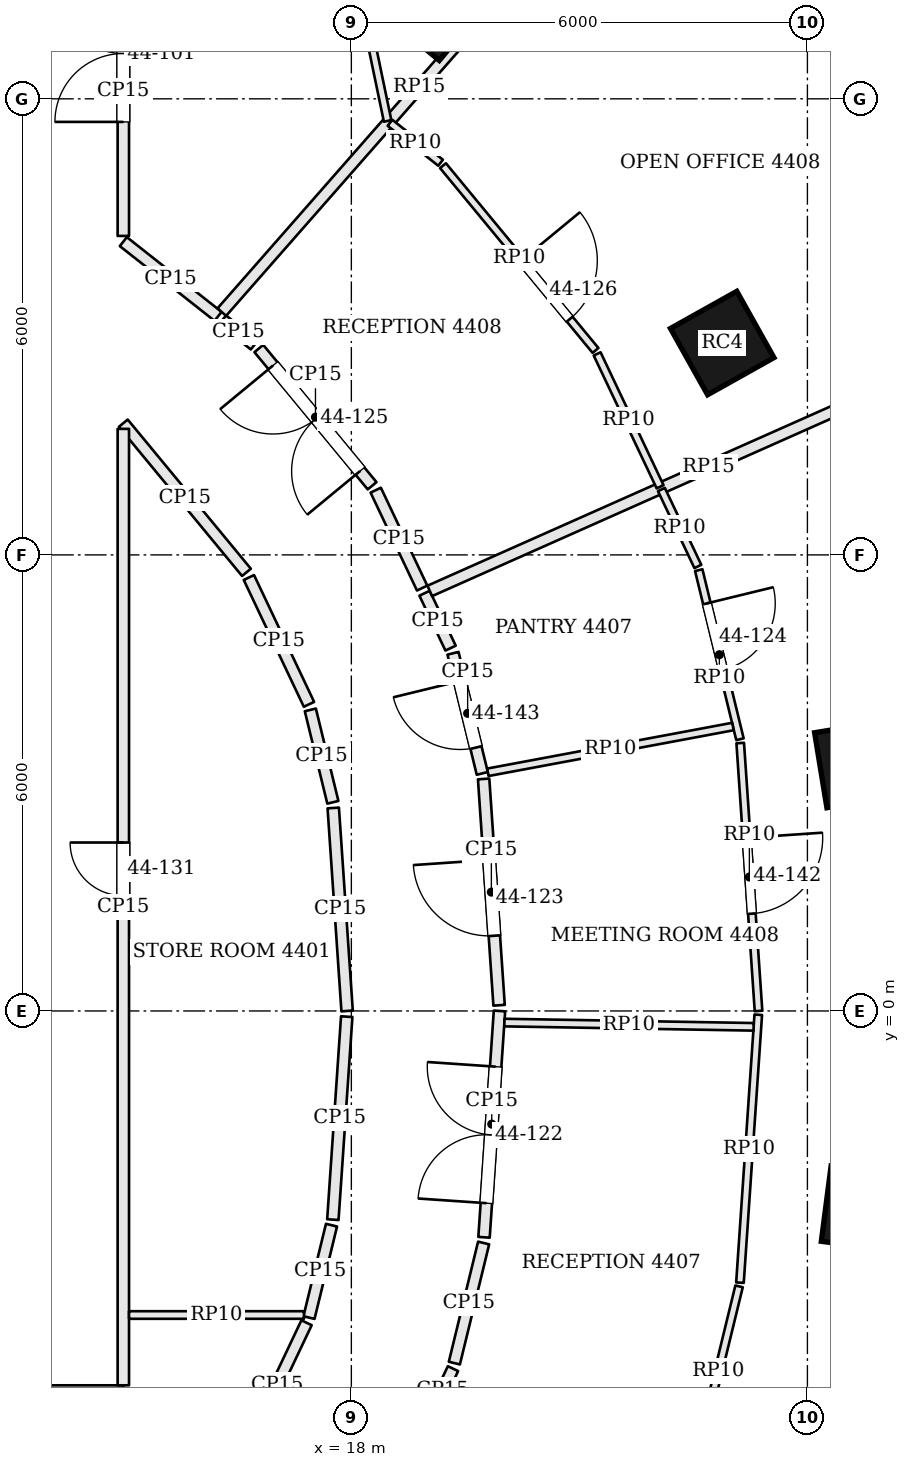
"""IFC4 building model, lengths in metres.
Left out: names, types, materials, properties, quantities, classifications, styles, units other than length and angle.
Written with IfcOpenShell. Run it as: python <this file> out.ifc"""

import sys

from ifc_helpers import new_model, si_unit, direction, frame, frame_2d, origin, origin_2d, place, context, subcontext, project, spatial, rectangle, extrude, element, fill, save


model = new_model("IFC4")
c1 = context("Model", 3, precision=1e-05, world=origin(), true_north=direction((0.0, 1.0)))
c2 = subcontext(c1, "Body", "Model", "MODEL_VIEW")
j1 = project(units=[si_unit("LENGTHUNIT", "METRE"), si_unit("PLANEANGLEUNIT", "RADIAN")], contexts=[c1])
p1 = place(None, origin())
s1 = spatial("IfcSite", under=j1, at=p1, CompositionType="ELEMENT")
p2 = place(p1, origin())
s2 = spatial("IfcBuilding", under=s1, at=p2, CompositionType="ELEMENT")
p3 = place(p2, frame((0.0, 0.0, 181.8)))
s3 = spatial("IfcBuildingStorey", under=s2, at=p3, CompositionType="ELEMENT", Elevation=181.8)
for number, where, z_axis, x_axis in (
    (1, (24.669, 3.248, 0.0), (0.0, 0.0, 1.0), (-0.162, 0.987, 0.0)),
    (2, (22.879, 8.787, 0.0), (0.0, 0.0, 1.0), (-0.489, 0.873, 0.0)),
    (3, (19.092, 13.209, 0.0), (0.0, 0.0, 1.0), (-0.769, 0.639, 0.0)),
    (4, (24.743, -2.599, 0.0), (0.0, 0.0, 1.0), (0.128, 0.992, 0.0)),
):
    element("IfcColumn", number, at=place(p3, frame(where, z_axis=z_axis, x_axis=x_axis)), inside=s3, PredefinedType="COLUMN", context=c2, shape_type="SweptSolid", body=[
        extrude(rectangle(XDim=1.0, YDim=1.0, at=origin_2d()), origin(), (0.0, 0.0, 1.0), 3.9),
    ])
p4 = place(p3, frame((16.246, 9.138, 0.0), z_axis=(0.0, 0.0, 1.0), x_axis=(-0.785126783061, 0.619335074512, 0.0)))
e5 = element("IfcWall", 5, at=p4, inside=s3, PredefinedType="PARTITIONING", context=c2, shape_type="SweptSolid", body=[
    extrude(rectangle(XDim=1.587, YDim=0.15, at=frame_2d((0.794, 0.0))), origin(), (0.0, 0.0, 1.0), 3.084),
])
p5 = place(p3, frame((15.0, 10.196, 0.0), z_axis=(0.0, 0.0, 1.0), x_axis=(0.0, 1.0, 0.0)))
e6 = element("IfcWall", 6, at=p5, inside=s3, PredefinedType="PARTITIONING", context=c2, shape_type="SweptSolid", body=[
    extrude(rectangle(XDim=3.804, YDim=0.15, at=frame_2d((1.902, 0.0))), origin(), (0.0, 0.0, 1.0), 3.084),
])
p6 = place(p5, frame((1.5, 0.0, 0.0)))
e7 = element("IfcOpeningElement", 7, at=p6, cuts=e6, PredefinedType="OPENING", context=c2, shape_type="SweptSolid", body=[
    extrude(rectangle(XDim=1.8, YDim=2.1, at=frame_2d((0.9, 1.05))), frame((0.0, 0.085, 0.0), z_axis=(0.0, -1.0, 0.0), x_axis=(1.0, 0.0, 0.0)), (0.0, 0.0, 1.0), 0.17),
])
p7 = place(p3, frame((21.493, 15.114, 0.0), z_axis=(0.0, 0.0, 1.0), x_axis=(-0.659778549164, -0.751460089467, 0.0)))
e8 = element("IfcWall", 8, at=p7, inside=s3, PredefinedType="PARTITIONING", context=c2, shape_type="SweptSolid", body=[
    extrude(rectangle(XDim=7.877, YDim=0.15, at=frame_2d((3.938, 0.0))), origin(), (0.0, 0.0, 1.0), 3.234),
])
p8 = place(p3, frame((19.065, -5.28, 0.0), z_axis=(0.0, 0.0, 1.0), x_axis=(0.428202003813, 0.903683043954, 0.0)))
e9 = element("IfcWall", 9, at=p8, inside=s3, PredefinedType="PARTITIONING", context=c2, shape_type="SweptSolid", body=[
    extrude(rectangle(XDim=0.635, YDim=0.15, at=frame_2d((0.318, 0.0))), origin(), (0.0, 0.0, 1.0), 3.084),
])
p9 = place(p3, frame((19.355, -4.633, 0.0), z_axis=(0.0, 0.0, 1.0), x_axis=(0.236703930685, 0.971581828359, 0.0)))
e10 = element("IfcWall", 10, at=p9, inside=s3, PredefinedType="PARTITIONING", context=c2, shape_type="SweptSolid", body=[
    extrude(rectangle(XDim=1.626, YDim=0.15, at=frame_2d((0.813, 0.0))), origin(), (0.0, 0.0, 1.0), 3.084),
])
p10 = place(p3, frame((19.745, -2.978, 0.0), z_axis=(0.0, 0.0, 1.0), x_axis=(0.068142324, 0.997675610447, 0.0)))
e11 = element("IfcWall", 11, at=p10, inside=s3, PredefinedType="PARTITIONING", context=c2, shape_type="SweptSolid", body=[
    extrude(rectangle(XDim=2.984, YDim=0.15, at=frame_2d((1.492, 0.0))), origin(), (0.0, 0.0, 1.0), 3.084),
])
p11 = place(p10, frame((0.45, 0.0, 0.0)))
e12 = element("IfcOpeningElement", 12, at=p11, cuts=e11, PredefinedType="OPENING", context=c2, shape_type="SweptSolid", body=[
    extrude(rectangle(XDim=1.8, YDim=2.1, at=frame_2d((0.9, 1.05))), frame((0.0, 0.085, 0.0), z_axis=(0.0, -1.0, 0.0), x_axis=(1.0, 0.0, 0.0)), (0.0, 0.0, 1.0), 0.17),
])
p12 = place(p3, frame((19.944, 0.075, 0.0), z_axis=(0.0, 0.0, 1.0), x_axis=(-0.068136763128, 0.997675990245, 0.0)))
e13 = element("IfcWall", 13, at=p12, inside=s3, PredefinedType="PARTITIONING", context=c2, shape_type="SweptSolid", body=[
    extrude(rectangle(XDim=2.985, YDim=0.15, at=frame_2d((1.492, 0.0))), origin(), (0.0, 0.0, 1.0), 3.084),
])
p13 = place(p12, frame((0.917, 0.0, 0.0)))
e14 = element("IfcOpeningElement", 14, at=p13, cuts=e13, PredefinedType="OPENING", context=c2, shape_type="SweptSolid", body=[
    extrude(rectangle(XDim=1.0, YDim=2.4, at=frame_2d((0.5, 1.2))), frame((0.0, 0.085, 0.0), z_axis=(0.0, -1.0, 0.0), x_axis=(1.0, 0.0, 0.0)), (0.0, 0.0, 1.0), 0.17),
])
p14 = place(p3, frame((19.722, 3.125, 0.0), z_axis=(0.0, 0.0, 1.0), x_axis=(-0.236703930685, 0.971581828359, 0.0)))
e15 = element("IfcWall", 15, at=p14, inside=s3, PredefinedType="PARTITIONING", context=c2, shape_type="SweptSolid", body=[
    extrude(rectangle(XDim=1.626, YDim=0.15, at=frame_2d((0.813, 0.0))), origin(), (0.0, 0.0, 1.0), 3.084),
])
p15 = place(p14, frame((0.35, 0.0, 0.0)))
e16 = element("IfcOpeningElement", 16, at=p15, cuts=e15, PredefinedType="OPENING", context=c2, shape_type="SweptSolid", body=[
    extrude(rectangle(XDim=0.9, YDim=2.1, at=frame_2d((0.45, 1.05))), frame((0.0, 0.085, 0.0), z_axis=(0.0, -1.0, 0.0), x_axis=(1.0, 0.0, 0.0)), (0.0, 0.0, 1.0), 0.17),
])
p16 = place(p3, frame((19.305, 4.773, 0.0), z_axis=(0.0, 0.0, 1.0), x_axis=(-0.428296443676, 0.90363828844, 0.0)))
e17 = element("IfcWall", 17, at=p16, inside=s3, PredefinedType="PARTITIONING", context=c2, shape_type="SweptSolid", body=[
    extrude(rectangle(XDim=0.799, YDim=0.15, at=frame_2d((0.399, 0.0))), origin(), (0.0, 0.0, 1.0), 3.084),
])
p17 = place(p3, frame((26.367, 8.789, 0.0), z_axis=(0.0, 0.0, 1.0), x_axis=(-0.913673557468, -0.406448804137, 0.0)))
e18 = element("IfcWall", 18, at=p17, inside=s3, PredefinedType="PARTITIONING", context=c2, shape_type="SweptSolid", body=[
    extrude(rectangle(XDim=8.029, YDim=0.15, at=frame_2d((4.014, 0.0))), origin(), (0.0, 0.0, 1.0), 3.234),
])
p18 = place(p3, frame((18.931, 5.563, 0.0), z_axis=(0.0, 0.0, 1.0), x_axis=(-0.428204145682, 0.903682029046, 0.0)))
e19 = element("IfcWall", 19, at=p18, inside=s3, PredefinedType="PARTITIONING", context=c2, shape_type="SweptSolid", body=[
    extrude(rectangle(XDim=1.425, YDim=0.15, at=frame_2d((0.713, 0.0))), origin(), (0.0, 0.0, 1.0), 3.084),
])
p19 = place(p3, frame((18.273, 6.909, 0.0), z_axis=(0.0, 0.0, 1.0), x_axis=(-0.63653648943, 0.771246586783, 0.0)))
e20 = element("IfcWall", 20, at=p19, inside=s3, PredefinedType="PARTITIONING", context=c2, shape_type="SweptSolid", body=[
    extrude(rectangle(XDim=2.342, YDim=0.15, at=frame_2d((1.171, 0.0))), origin(), (0.0, 0.0, 1.0), 3.084),
])
p20 = place(p19, frame((0.25, 0.0, 0.0)))
e21 = element("IfcOpeningElement", 21, at=p20, cuts=e20, PredefinedType="OPENING", context=c2, shape_type="SweptSolid", body=[
    extrude(rectangle(XDim=1.8, YDim=2.1, at=frame_2d((0.9, 1.05))), frame((0.0, 0.085, 0.0), z_axis=(0.0, -1.0, 0.0), x_axis=(1.0, 0.0, 0.0)), (0.0, 0.0, 1.0), 0.17),
])
p21 = place(p3, frame((16.724, 8.761, 0.0), z_axis=(0.0, 0.0, 1.0), x_axis=(-0.785093642841, 0.619377083827, 0.0)))
e22 = element("IfcWall", 22, at=p21, inside=s3, PredefinedType="PARTITIONING", context=c2, shape_type="SweptSolid", body=[
    extrude(rectangle(XDim=0.533, YDim=0.15, at=frame_2d((0.267, 0.0))), origin(), (0.0, 0.0, 1.0), 3.084),
])
p22 = place(p3, frame((15.0, 7.733, 0.0), z_axis=(0.0, 0.0, 1.0), x_axis=(0.636601263488, -0.771193121938, 0.0)))
e23 = element("IfcWall", 23, at=p22, inside=s3, PredefinedType="PARTITIONING", context=c2, shape_type="SweptSolid", body=[
    extrude(rectangle(XDim=2.545, YDim=0.15, at=frame_2d((1.272, 0.0))), origin(), (0.0, 0.0, 1.0), 3.084),
])
p23 = place(p3, frame((16.652, 5.702, 0.0), z_axis=(0.0, 0.0, 1.0), x_axis=(0.428126129773, -0.903718992279, 0.0)))
e24 = element("IfcWall", 24, at=p23, inside=s3, PredefinedType="PARTITIONING", context=c2, shape_type="SweptSolid", body=[
    extrude(rectangle(XDim=1.846, YDim=0.15, at=frame_2d((0.923, 0.0))), origin(), (0.0, 0.0, 1.0), 3.084),
])
p24 = place(p3, frame((17.46, 3.961, 0.0), z_axis=(0.0, 0.0, 1.0), x_axis=(0.236655249498, -0.971593687137, 0.0)))
e25 = element("IfcWall", 25, at=p24, inside=s3, PredefinedType="PARTITIONING", context=c2, shape_type="SweptSolid", body=[
    extrude(rectangle(XDim=1.251, YDim=0.15, at=frame_2d((0.626, 0.0))), origin(), (0.0, 0.0, 1.0), 3.084),
])
p25 = place(p3, frame((17.762, 2.67, 0.0), z_axis=(0.0, 0.0, 1.0), x_axis=(0.068135311644, -0.997676089373, 0.0)))
e26 = element("IfcWall", 26, at=p25, inside=s3, PredefinedType="PARTITIONING", context=c2, shape_type="SweptSolid", body=[
    extrude(rectangle(XDim=2.677, YDim=0.15, at=frame_2d((1.338, 0.0))), origin(), (0.0, 0.0, 1.0), 3.084),
])
p26 = place(p3, frame((17.939, -0.075, 0.0), z_axis=(0.0, 0.0, 1.0), x_axis=(-0.068226099283, -0.99766988497, 0.0)))
e27 = element("IfcWall", 27, at=p26, inside=s3, PredefinedType="PARTITIONING", context=c2, shape_type="SweptSolid", body=[
    extrude(rectangle(XDim=2.677, YDim=0.15, at=frame_2d((1.338, 0.0))), origin(), (0.0, 0.0, 1.0), 3.084),
])
p27 = place(p3, frame((17.739, -2.818, 0.0), z_axis=(0.0, 0.0, 1.0), x_axis=(-0.236884307907, -0.971537865792, 0.0)))
e28 = element("IfcWall", 28, at=p27, inside=s3, PredefinedType="PARTITIONING", context=c2, shape_type="SweptSolid", body=[
    extrude(rectangle(XDim=1.251, YDim=0.15, at=frame_2d((0.625, 0.0))), origin(), (0.0, 0.0, 1.0), 3.084),
])
p28 = place(p3, frame((17.41, -4.102, 0.0), z_axis=(0.0, 0.0, 1.0), x_axis=(-0.428074720318, -0.903743345107, 0.0)))
e29 = element("IfcWall", 29, at=p28, inside=s3, PredefinedType="PARTITIONING", context=c2, shape_type="SweptSolid", body=[
    extrude(rectangle(XDim=1.806, YDim=0.15, at=frame_2d((0.903, 0.0))), origin(), (0.0, 0.0, 1.0), 3.084),
])
p29 = place(p3, frame((-14.925, -5.0, 0.0), z_axis=(0.0, 0.0, 1.0), x_axis=(1.0, 0.0, 0.0)))
e30 = element("IfcWall", 30, at=p29, inside=s3, PredefinedType="PARTITIONING", context=c2, shape_type="SweptSolid", body=[
    extrude(rectangle(XDim=29.925, YDim=0.15, at=frame_2d((14.962, 0.0))), origin(), (0.0, 0.0, 1.0), 3.084),
])
p30 = place(p29, frame((2.175, 0.0, 0.0)))
e31 = element("IfcOpeningElement", 31, at=p30, cuts=e30, PredefinedType="OPENING", context=c2, shape_type="SweptSolid", body=[
    extrude(rectangle(XDim=1.0, YDim=2.1, at=frame_2d((0.5, 1.05))), frame((0.0, 0.085, 0.0), z_axis=(0.0, -1.0, 0.0), x_axis=(1.0, 0.0, 0.0)), (0.0, 0.0, 1.0), 0.17),
])
p31 = place(p29, frame((14.025, 0.0, 0.0)))
e32 = element("IfcOpeningElement", 32, at=p31, cuts=e30, PredefinedType="OPENING", context=c2, shape_type="SweptSolid", body=[
    extrude(rectangle(XDim=1.8, YDim=2.1, at=frame_2d((0.9, 1.05))), frame((0.0, 0.085, 0.0), z_axis=(0.0, -1.0, 0.0), x_axis=(1.0, 0.0, 0.0)), (0.0, 0.0, 1.0), 0.17),
])
p32 = place(p29, frame((26.675, 0.0, 0.0)))
e33 = element("IfcOpeningElement", 33, at=p32, cuts=e30, PredefinedType="OPENING", context=c2, shape_type="SweptSolid", body=[
    extrude(rectangle(XDim=1.0, YDim=2.1, at=frame_2d((0.5, 1.05))), frame((0.0, 0.085, 0.0), z_axis=(0.0, -1.0, 0.0), x_axis=(1.0, 0.0, 0.0)), (0.0, 0.0, 1.0), 0.17),
])
p33 = place(p3, frame((15.0, -4.925, 0.0), z_axis=(0.0, 0.0, 1.0), x_axis=(0.0, 1.0, 0.0)))
e34 = element("IfcWall", 34, at=p33, inside=s3, PredefinedType="PARTITIONING", context=c2, shape_type="SweptSolid", body=[
    extrude(rectangle(XDim=12.583, YDim=0.15, at=frame_2d((6.292, 0.0))), origin(), (0.0, 0.0, 1.0), 3.084),
])
p34 = place(p33, frame((6.441, 0.0, 0.0)))
e35 = element("IfcOpeningElement", 35, at=p34, cuts=e34, PredefinedType="OPENING", context=c2, shape_type="SweptSolid", body=[
    extrude(rectangle(XDim=0.7, YDim=2.1, at=frame_2d((0.35, 1.05))), frame((0.0, 0.085, 0.0), z_axis=(0.0, -1.0, 0.0), x_axis=(1.0, 0.0, 0.0)), (0.0, 0.0, 1.0), 0.17),
])
p35 = place(p3, frame((17.656, 15.652, 0.0), z_axis=(0.0, 0.0, 1.0), x_axis=(0.203733969948, -0.979026286414, 0.0)))
e36 = element("IfcWall", 36, at=p35, inside=s3, PredefinedType="PARTITIONING", context=c2, shape_type="SweptSolid", body=[
    extrude(rectangle(XDim=4.028, YDim=0.1, at=frame_2d((2.014, 0.0))), origin(), (0.0, 0.0, 1.0), 3.084),
])
p36 = place(p3, frame((22.079, 6.86, 0.0), z_axis=(0.0, 0.0, 1.0), x_axis=(0.428105084675, -0.903728961844, 0.0)))
e37 = element("IfcWall", 37, at=p36, inside=s3, PredefinedType="PARTITIONING", context=c2, shape_type="SweptSolid", body=[
    extrude(rectangle(XDim=1.12, YDim=0.1, at=frame_2d((0.56, 0.0))), origin(), (0.0, 0.0, 1.0), 3.084),
])
p37 = place(p3, frame((22.57, 5.799, 0.0), z_axis=(0.0, 0.0, 1.0), x_axis=(0.236811358433, -0.971555649727, 0.0)))
e38 = element("IfcWall", 38, at=p37, inside=s3, PredefinedType="PARTITIONING", context=c2, shape_type="SweptSolid", body=[
    extrude(rectangle(XDim=2.29, YDim=0.1, at=frame_2d((1.145, 0.0))), origin(), (0.0, 0.0, 1.0), 3.084),
])
p38 = place(p37, frame((0.45, 0.0, 0.0)))
e39 = element("IfcOpeningElement", 39, at=p38, cuts=e38, PredefinedType="OPENING", context=c2, shape_type="SweptSolid", body=[
    extrude(rectangle(XDim=0.9, YDim=2.1, at=frame_2d((0.45, 1.05))), frame((0.0, 0.06, 0.0), z_axis=(0.0, -1.0, 0.0), x_axis=(1.0, 0.0, 0.0)), (0.0, 0.0, 1.0), 0.12),
])
p39 = place(p3, frame((23.116, 3.525, 0.0), z_axis=(0.0, 0.0, 1.0), x_axis=(0.068138009452, -0.997675905125, 0.0)))
e40 = element("IfcWall", 40, at=p39, inside=s3, PredefinedType="PARTITIONING", context=c2, shape_type="SweptSolid", body=[
    extrude(rectangle(XDim=3.533, YDim=0.1, at=frame_2d((1.767, 0.0))), origin(), (0.0, 0.0, 1.0), 3.084),
])
p40 = place(p39, frame((1.25, 0.0, 0.0)))
e41 = element("IfcOpeningElement", 41, at=p40, cuts=e40, PredefinedType="OPENING", context=c2, shape_type="SweptSolid", body=[
    extrude(rectangle(XDim=1.0, YDim=2.4, at=frame_2d((0.5, 1.2))), frame((0.0, 0.06, 0.0), z_axis=(0.0, -1.0, 0.0), x_axis=(1.0, 0.0, 0.0)), (0.0, 0.0, 1.0), 0.12),
])
p41 = place(p3, frame((23.354, -0.05, 0.0), z_axis=(0.0, 0.0, 1.0), x_axis=(-0.06820679361, -0.99767120501, 0.0)))
e42 = element("IfcWall", 42, at=p41, inside=s3, PredefinedType="PARTITIONING", context=c2, shape_type="SweptSolid", body=[
    extrude(rectangle(XDim=3.533, YDim=0.1, at=frame_2d((1.767, 0.0))), origin(), (0.0, 0.0, 1.0), 3.084),
])
p42 = place(p3, frame((23.101, -3.623, 0.0), z_axis=(0.0, 0.0, 1.0), x_axis=(-0.236811358433, -0.971555649727, 0.0)))
e43 = element("IfcWall", 43, at=p42, inside=s3, PredefinedType="PARTITIONING", context=c2, shape_type="SweptSolid", body=[
    extrude(rectangle(XDim=2.29, YDim=0.1, at=frame_2d((1.145, 0.0))), origin(), (0.0, 0.0, 1.0), 3.084),
])
p43 = place(p3, frame((20.013, -0.153, 0.0), z_axis=(0.0, 0.0, 1.0), x_axis=(0.999854678593, -0.017047630214, 0.0)))
e44 = element("IfcWall", 44, at=p43, inside=s3, PredefinedType="PARTITIONING", context=c2, shape_type="SweptSolid", body=[
    extrude(rectangle(XDim=3.28, YDim=0.1, at=frame_2d((1.64, 0.0))), origin(), (0.0, 0.0, 1.0), 3.084),
])
p44 = place(p3, frame((19.796, 3.14, 0.0), z_axis=(0.0, 0.0, 1.0), x_axis=(0.983010938824, 0.183546980778, 0.0)))
e45 = element("IfcWall", 45, at=p44, inside=s3, PredefinedType="PARTITIONING", context=c2, shape_type="SweptSolid", body=[
    extrude(rectangle(XDim=3.28, YDim=0.1, at=frame_2d((1.64, 0.0))), origin(), (0.0, 0.0, 1.0), 3.084),
])
p45 = place(p3, frame((18.508, 11.684, 0.0), z_axis=(0.0, 0.0, 1.0), x_axis=(0.785067093858, -0.619410734603, 0.0)))
e46 = element("IfcWall", 46, at=p45, inside=s3, PredefinedType="PARTITIONING", context=c2, shape_type="SweptSolid", body=[
    extrude(rectangle(XDim=0.847, YDim=0.1, at=frame_2d((0.424, 0.0))), origin(), (0.0, 0.0, 1.0), 3.084),
])
p46 = place(p3, frame((19.206, 11.121, 0.0), z_axis=(0.0, 0.0, 1.0), x_axis=(0.636597206989, -0.771196470462, 0.0)))
e47 = element("IfcWall", 47, at=p46, inside=s3, PredefinedType="PARTITIONING", context=c2, shape_type="SweptSolid", body=[
    extrude(rectangle(XDim=3.152, YDim=0.1, at=frame_2d((1.576, 0.0))), origin(), (0.0, 0.0, 1.0), 3.084),
])
p47 = place(p46, frame((1.619, 0.0, 0.0)))
e48 = element("IfcOpeningElement", 48, at=p47, cuts=e47, PredefinedType="OPENING", context=c2, shape_type="SweptSolid", body=[
    extrude(rectangle(XDim=1.0, YDim=2.1, at=frame_2d((0.5, 1.05))), frame((0.0, 0.06, 0.0), z_axis=(0.0, -1.0, 0.0), x_axis=(1.0, 0.0, 0.0)), (0.0, 0.0, 1.0), 0.12),
])
p48 = place(p3, frame((21.234, 8.644, 0.0), z_axis=(0.0, 0.0, 1.0), x_axis=(0.428183987328, -0.903691580682, 0.0)))
e49 = element("IfcWall", 49, at=p48, inside=s3, PredefinedType="PARTITIONING", context=c2, shape_type="SweptSolid", body=[
    extrude(rectangle(XDim=1.935, YDim=0.1, at=frame_2d((0.967, 0.0))), origin(), (0.0, 0.0, 1.0), 3.084),
])
p49 = place(p3, frame((15.075, -4.0, 0.0), z_axis=(0.0, 0.0, 1.0), x_axis=(1.0, 0.0, 0.0)))
e50 = element("IfcWall", 50, at=p49, inside=s3, PredefinedType="PARTITIONING", context=c2, shape_type="SweptSolid", body=[
    extrude(rectangle(XDim=2.301, YDim=0.1, at=frame_2d((1.15, 0.0))), origin(), (0.0, 0.0, 1.0), 3.084),
])
p50 = place(p6, origin())
e51 = element("IfcDoor", 51, at=p50, inside=s3, OperationType="DOUBLE_DOOR_SINGLE_SWING", PredefinedType="DOOR", context=c2, shape_type="SweptSolid", body=[
    extrude(rectangle(XDim=1.8, YDim=2.1, at=frame_2d((0.9, 1.05))), frame((0.0, 0.025, 0.0), z_axis=(0.0, -1.0, 0.0), x_axis=(1.0, 0.0, 0.0)), (0.0, 0.0, 1.0), 0.05),
])
fill(e7, e51)
p51 = place(p11, origin())
e52 = element("IfcDoor", 52, at=p51, inside=s3, OperationType="DOUBLE_DOOR_SINGLE_SWING", PredefinedType="DOOR", context=c2, shape_type="SweptSolid", body=[
    extrude(rectangle(XDim=1.8, YDim=2.1, at=frame_2d((0.9, 1.05))), frame((0.0, 0.025, 0.0), z_axis=(0.0, -1.0, 0.0), x_axis=(1.0, 0.0, 0.0)), (0.0, 0.0, 1.0), 0.05),
])
fill(e12, e52)
p52 = place(p13, origin())
e53 = element("IfcDoor", 53, at=p52, inside=s3, OperationType="SINGLE_SWING_RIGHT", PredefinedType="DOOR", context=c2, shape_type="SweptSolid", body=[
    extrude(rectangle(XDim=1.0, YDim=2.4, at=frame_2d((0.5, 1.2))), frame((0.0, 0.025, 0.0), z_axis=(0.0, -1.0, 0.0), x_axis=(1.0, 0.0, 0.0)), (0.0, 0.0, 1.0), 0.05),
])
fill(e14, e53)
p53 = place(p38, origin())
e54 = element("IfcDoor", 54, at=p53, inside=s3, OperationType="SINGLE_SWING_LEFT", PredefinedType="DOOR", context=c2, shape_type="SweptSolid", body=[
    extrude(rectangle(XDim=0.9, YDim=2.1, at=frame_2d((0.45, 1.05))), frame((0.0, 0.025, 0.0), z_axis=(0.0, -1.0, 0.0), x_axis=(1.0, 0.0, 0.0)), (0.0, 0.0, 1.0), 0.05),
])
fill(e39, e54)
p54 = place(p20, origin())
e55 = element("IfcDoor", 55, at=p54, inside=s3, OperationType="DOUBLE_DOOR_SINGLE_SWING", PredefinedType="DOOR", context=c2, shape_type="SweptSolid", body=[
    extrude(rectangle(XDim=1.8, YDim=2.1, at=frame_2d((0.9, 1.05))), frame((0.0, 0.025, 0.0), z_axis=(0.0, -1.0, 0.0), x_axis=(1.0, 0.0, 0.0)), (0.0, 0.0, 1.0), 0.05),
])
fill(e21, e55)
p55 = place(p47, origin())
e56 = element("IfcDoor", 56, at=p55, inside=s3, OperationType="SINGLE_SWING_LEFT", PredefinedType="DOOR", context=c2, shape_type="SweptSolid", body=[
    extrude(rectangle(XDim=1.0, YDim=2.1, at=frame_2d((0.5, 1.05))), frame((0.0, 0.025, 0.0), z_axis=(0.0, -1.0, 0.0), x_axis=(1.0, 0.0, 0.0)), (0.0, 0.0, 1.0), 0.05),
])
fill(e48, e56)
p56 = place(p34, origin())
e57 = element("IfcDoor", 57, at=p56, inside=s3, OperationType="SINGLE_SWING_RIGHT", PredefinedType="DOOR", context=c2, shape_type="SweptSolid", body=[
    extrude(rectangle(XDim=0.7, YDim=2.1, at=frame_2d((0.35, 1.05))), frame((0.0, 0.025, 0.0), z_axis=(0.0, -1.0, 0.0), x_axis=(1.0, 0.0, 0.0)), (0.0, 0.0, 1.0), 0.05),
])
fill(e35, e57)
p57 = place(p40, origin())
e58 = element("IfcDoor", 58, at=p57, inside=s3, OperationType="SINGLE_SWING_LEFT", PredefinedType="DOOR", context=c2, shape_type="SweptSolid", body=[
    extrude(rectangle(XDim=1.0, YDim=2.4, at=frame_2d((0.5, 1.2))), frame((0.0, 0.025, 0.0), z_axis=(0.0, -1.0, 0.0), x_axis=(1.0, 0.0, 0.0)), (0.0, 0.0, 1.0), 0.05),
])
fill(e41, e58)
p58 = place(p15, origin())
e59 = element("IfcDoor", 59, at=p58, inside=s3, OperationType="SINGLE_SWING_RIGHT", PredefinedType="DOOR", context=c2, shape_type="SweptSolid", body=[
    extrude(rectangle(XDim=0.9, YDim=2.1, at=frame_2d((0.45, 1.05))), frame((0.0, 0.025, 0.0), z_axis=(0.0, -1.0, 0.0), x_axis=(1.0, 0.0, 0.0)), (0.0, 0.0, 1.0), 0.05),
])
fill(e16, e59)
save(model, sys.argv[1])
